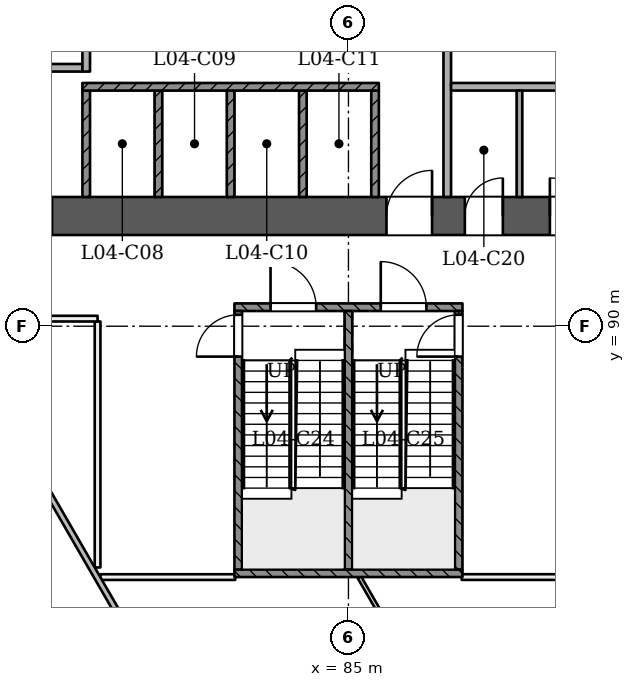
"""IFC4 building model, lengths in metres.
Left out: names, types, materials, properties, quantities, classifications, styles, units other than length and angle.
Written with IfcOpenShell. Run it as: python <this file> out.ifc"""

import sys

from ifc_helpers import new_model, si_unit, direction, frame, frame_2d, origin, place, context, subcontext, project, spatial, rectangle, extrude, element, fill, save


model = new_model("IFC4")
c1 = context("Model", 3, precision=1e-05, world=origin(), true_north=direction((0.0, 1.0)))
c2 = subcontext(c1, "Body", "Model", "MODEL_VIEW")
j1 = project(units=[si_unit("LENGTHUNIT", "METRE"), si_unit("PLANEANGLEUNIT", "RADIAN")], contexts=[c1])
p1 = place(None, origin())
s1 = spatial("IfcSite", under=j1, at=p1, CompositionType="ELEMENT")
p2 = place(p1, origin())
s2 = spatial("IfcBuilding", under=s1, at=p2, CompositionType="ELEMENT")
p3 = place(p2, frame((0.0, 0.0, 22.5)))
s3 = spatial("IfcBuildingStorey", under=s2, at=p3, CompositionType="ELEMENT", Elevation=22.5)
p4 = place(p3, frame((72.5, 92.9, 0.0), z_axis=(0.0, 0.0, 1.0), x_axis=(1.0, 0.0, 0.0)))
e1 = element("IfcWall", 1, at=p4, inside=s3, PredefinedType="SHEAR", context=c2, shape_type="SweptSolid", body=[
    extrude(rectangle(XDim=25.5, YDim=1.0, at=frame_2d((12.75, 0.0))), origin(), (0.0, 0.0, 1.0), 4.5),
])
p5 = place(p4, frame((1.3, 0.0, 0.0)))
e2 = element("IfcOpeningElement", 2, at=p5, cuts=e1, PredefinedType="OPENING", context=c2, shape_type="SweptSolid", body=[
    extrude(rectangle(XDim=1.2, YDim=2.1, at=frame_2d((0.6, 1.05))), frame((0.0, 0.51, 0.0), z_axis=(0.0, -1.0, 0.0), x_axis=(1.0, 0.0, 0.0)), (0.0, 0.0, 1.0), 1.021),
])
p6 = place(p4, frame((3.5, 0.0, 0.0)))
e3 = element("IfcOpeningElement", 3, at=p6, cuts=e1, PredefinedType="OPENING", context=c2, shape_type="SweptSolid", body=[
    extrude(rectangle(XDim=1.2, YDim=2.1, at=frame_2d((0.6, 1.05))), frame((0.0, 0.51, 0.0), z_axis=(0.0, -1.0, 0.0), x_axis=(1.0, 0.0, 0.0)), (0.0, 0.0, 1.0), 1.021),
])
p7 = place(p4, frame((13.5, 0.0, 0.0)))
e4 = element("IfcOpeningElement", 4, at=p7, cuts=e1, PredefinedType="OPENING", context=c2, shape_type="SweptSolid", body=[
    extrude(rectangle(XDim=1.2, YDim=2.1, at=frame_2d((0.6, 1.05))), frame((0.0, 0.51, 0.0), z_axis=(0.0, -1.0, 0.0), x_axis=(1.0, 0.0, 0.0)), (0.0, 0.0, 1.0), 1.021),
])
p8 = place(p4, frame((15.562, 0.0, 0.0)))
e5 = element("IfcOpeningElement", 5, at=p8, cuts=e1, PredefinedType="OPENING", context=c2, shape_type="SweptSolid", body=[
    extrude(rectangle(XDim=1.0, YDim=2.1, at=frame_2d((0.5, 1.05))), frame((0.0, 0.51, 0.0), z_axis=(0.0, -1.0, 0.0), x_axis=(1.0, 0.0, 0.0)), (0.0, 0.0, 1.0), 1.021),
])
p9 = place(p4, frame((17.8, 0.0, 0.0)))
e6 = element("IfcOpeningElement", 6, at=p9, cuts=e1, PredefinedType="OPENING", context=c2, shape_type="SweptSolid", body=[
    extrude(rectangle(XDim=1.0, YDim=2.1, at=frame_2d((0.5, 1.05))), frame((0.0, 0.51, 0.0), z_axis=(0.0, -1.0, 0.0), x_axis=(1.0, 0.0, 0.0)), (0.0, 0.0, 1.0), 1.021),
])
p10 = place(p4, frame((20.35, 0.0, 0.0)))
e7 = element("IfcOpeningElement", 7, at=p10, cuts=e1, PredefinedType="OPENING", context=c2, shape_type="SweptSolid", body=[
    extrude(rectangle(XDim=1.0, YDim=2.1, at=frame_2d((0.5, 1.05))), frame((0.0, 0.51, 0.0), z_axis=(0.0, -1.0, 0.0), x_axis=(1.0, 0.0, 0.0)), (0.0, 0.0, 1.0), 1.021),
])
p11 = place(p4, frame((22.837, 0.0, 0.0)))
e8 = element("IfcOpeningElement", 8, at=p11, cuts=e1, PredefinedType="OPENING", context=c2, shape_type="SweptSolid", body=[
    extrude(rectangle(XDim=1.0, YDim=2.1, at=frame_2d((0.5, 1.05))), frame((0.0, 0.51, 0.0), z_axis=(0.0, -1.0, 0.0), x_axis=(1.0, 0.0, 0.0)), (0.0, 0.0, 1.0), 1.021),
])
p12 = place(p3, frame((61.093, 96.062, 0.0), z_axis=(0.0, 0.0, 1.0), x_axis=(0.5000018851, -0.866024315419, 0.0)))
e9 = element("IfcWall", 9, at=p12, inside=s3, PredefinedType="PARTITIONING", context=c2, shape_type="SweptSolid", body=[
    extrude(rectangle(XDim=45.0, YDim=0.15, at=frame_2d((22.5, 0.0))), origin(), (0.0, 0.0, 1.0), 3.6),
])
p13 = place(p12, frame((6.15, 0.0, 0.0)))
e10 = element("IfcOpeningElement", 10, at=p13, cuts=e9, PredefinedType="OPENING", context=c2, shape_type="SweptSolid", body=[
    extrude(rectangle(XDim=1.2, YDim=2.1, at=frame_2d((0.6, 1.05))), frame((0.0, 0.085, 0.0), z_axis=(0.0, -1.0, 0.0), x_axis=(1.0, 0.0, 0.0)), (0.0, 0.0, 1.0), 0.171),
])
p14 = place(p12, frame((16.3, 0.0, 0.0)))
e11 = element("IfcOpeningElement", 11, at=p14, cuts=e9, PredefinedType="OPENING", context=c2, shape_type="SweptSolid", body=[
    extrude(rectangle(XDim=1.2, YDim=2.1, at=frame_2d((0.6, 1.05))), frame((0.0, 0.085, 0.0), z_axis=(0.0, -1.0, 0.0), x_axis=(1.0, 0.0, 0.0)), (0.0, 0.0, 1.0), 0.171),
])
p15 = place(p12, frame((24.25, 0.0, 0.0)))
e12 = element("IfcOpeningElement", 12, at=p15, cuts=e9, PredefinedType="OPENING", context=c2, shape_type="SweptSolid", body=[
    extrude(rectangle(XDim=1.0, YDim=2.1, at=frame_2d((0.5, 1.05))), frame((0.0, 0.085, 0.0), z_axis=(0.0, -1.0, 0.0), x_axis=(1.0, 0.0, 0.0)), (0.0, 0.0, 1.0), 0.171),
])
p16 = place(p12, frame((27.721, 0.0, 0.0)))
e13 = element("IfcOpeningElement", 13, at=p16, cuts=e9, PredefinedType="OPENING", context=c2, shape_type="SweptSolid", body=[
    extrude(rectangle(XDim=0.9, YDim=2.1, at=frame_2d((0.45, 1.05))), frame((0.0, 0.085, 0.0), z_axis=(0.0, -1.0, 0.0), x_axis=(1.0, 0.0, 0.0)), (0.0, 0.0, 1.0), 0.171),
])
p17 = place(p12, frame((29.971, 0.0, 0.0)))
e14 = element("IfcOpeningElement", 14, at=p17, cuts=e9, PredefinedType="OPENING", context=c2, shape_type="SweptSolid", body=[
    extrude(rectangle(XDim=0.9, YDim=2.1, at=frame_2d((0.45, 1.05))), frame((0.0, 0.085, 0.0), z_axis=(0.0, -1.0, 0.0), x_axis=(1.0, 0.0, 0.0)), (0.0, 0.0, 1.0), 0.171),
])
p18 = place(p12, frame((37.65, 0.0, 0.0)))
e15 = element("IfcOpeningElement", 15, at=p18, cuts=e9, PredefinedType="OPENING", context=c2, shape_type="SweptSolid", body=[
    extrude(rectangle(XDim=1.2, YDim=2.1, at=frame_2d((0.6, 1.05))), frame((0.0, 0.085, 0.0), z_axis=(0.0, -1.0, 0.0), x_axis=(1.0, 0.0, 0.0)), (0.0, 0.0, 1.0), 0.171),
])
p19 = place(p3, frame((86.407, 57.091, 0.0), z_axis=(0.0, 0.0, 1.0), x_axis=(0.49999953585, 0.866025671762, 0.0)))
e16 = element("IfcWall", 16, at=p19, inside=s3, PredefinedType="PARTITIONING", context=c2, shape_type="SweptSolid", body=[
    extrude(rectangle(XDim=45.0, YDim=0.15, at=frame_2d((22.5, 0.0))), origin(), (0.0, 0.0, 1.0), 3.6),
])
p20 = place(p19, frame((6.15, 0.0, 0.0)))
e17 = element("IfcOpeningElement", 17, at=p20, cuts=e16, PredefinedType="OPENING", context=c2, shape_type="SweptSolid", body=[
    extrude(rectangle(XDim=1.2, YDim=2.1, at=frame_2d((0.6, 1.05))), frame((0.0, 0.085, 0.0), z_axis=(0.0, -1.0, 0.0), x_axis=(1.0, 0.0, 0.0)), (0.0, 0.0, 1.0), 0.171),
])
p21 = place(p19, frame((16.3, 0.0, 0.0)))
e18 = element("IfcOpeningElement", 18, at=p21, cuts=e16, PredefinedType="OPENING", context=c2, shape_type="SweptSolid", body=[
    extrude(rectangle(XDim=1.2, YDim=2.1, at=frame_2d((0.6, 1.05))), frame((0.0, 0.085, 0.0), z_axis=(0.0, -1.0, 0.0), x_axis=(1.0, 0.0, 0.0)), (0.0, 0.0, 1.0), 0.171),
])
p22 = place(p19, frame((24.25, 0.0, 0.0)))
e19 = element("IfcOpeningElement", 19, at=p22, cuts=e16, PredefinedType="OPENING", context=c2, shape_type="SweptSolid", body=[
    extrude(rectangle(XDim=1.0, YDim=2.1, at=frame_2d((0.5, 1.05))), frame((0.0, 0.085, 0.0), z_axis=(0.0, -1.0, 0.0), x_axis=(1.0, 0.0, 0.0)), (0.0, 0.0, 1.0), 0.171),
])
p23 = place(p19, frame((30.9, 0.0, 0.0)))
e20 = element("IfcOpeningElement", 20, at=p23, cuts=e16, PredefinedType="OPENING", context=c2, shape_type="SweptSolid", body=[
    extrude(rectangle(XDim=1.2, YDim=2.1, at=frame_2d((0.6, 1.05))), frame((0.0, 0.085, 0.0), z_axis=(0.0, -1.0, 0.0), x_axis=(1.0, 0.0, 0.0)), (0.0, 0.0, 1.0), 0.171),
])
p24 = place(p19, frame((36.761, 0.0, 0.0)))
e21 = element("IfcOpeningElement", 21, at=p24, cuts=e16, PredefinedType="OPENING", context=c2, shape_type="SweptSolid", body=[
    extrude(rectangle(XDim=1.0, YDim=2.1, at=frame_2d((0.5, 1.05))), frame((0.0, 0.085, 0.0), z_axis=(0.0, -1.0, 0.0), x_axis=(1.0, 0.0, 0.0)), (0.0, 0.0, 1.0), 0.171),
])
p25 = place(p19, frame((39.011, 0.0, 0.0)))
e22 = element("IfcOpeningElement", 22, at=p25, cuts=e16, PredefinedType="OPENING", context=c2, shape_type="SweptSolid", body=[
    extrude(rectangle(XDim=1.0, YDim=2.1, at=frame_2d((0.5, 1.05))), frame((0.0, 0.085, 0.0), z_axis=(0.0, -1.0, 0.0), x_axis=(1.0, 0.0, 0.0)), (0.0, 0.0, 1.0), 0.171),
])
p26 = place(p19, frame((42.25, 0.0, 0.0)))
e23 = element("IfcOpeningElement", 23, at=p26, cuts=e16, PredefinedType="OPENING", context=c2, shape_type="SweptSolid", body=[
    extrude(rectangle(XDim=1.0, YDim=2.1, at=frame_2d((0.5, 1.05))), frame((0.0, 0.085, 0.0), z_axis=(0.0, -1.0, 0.0), x_axis=(1.0, 0.0, 0.0)), (0.0, 0.0, 1.0), 0.171),
])
p27 = place(p3, frame((87.98, 83.4, 0.0), z_axis=(0.0, 0.0, 1.0), x_axis=(0.99999999763, -6.8851556e-05, 0.0)))
e24 = element("IfcWall", 24, at=p27, inside=s3, PredefinedType="PARTITIONING", context=c2, shape_type="SweptSolid", body=[
    extrude(rectangle(XDim=3.546, YDim=0.15, at=frame_2d((1.773, 0.0))), origin(), (0.0, 0.0, 1.0), 4.0),
])
p28 = place(p3, frame((102.75, 90.199, 0.0), z_axis=(0.0, 0.0, 1.0), x_axis=(-0.500001686779, -0.86602442992, 0.0)))
e25 = element("IfcWall", 25, at=p28, inside=s3, PredefinedType="PARTITIONING", context=c2, shape_type="SweptSolid", body=[
    extrude(rectangle(XDim=35.37, YDim=0.15, at=frame_2d((17.685, 0.0))), origin(), (0.0, 0.0, 1.0), 4.0),
])
p29 = place(p28, frame((10.315, 0.0, 0.0)))
e26 = element("IfcOpeningElement", 26, at=p29, cuts=e25, PredefinedType="OPENING", context=c2, shape_type="SweptSolid", body=[
    extrude(rectangle(XDim=1.0, YDim=2.1, at=frame_2d((0.5, 1.05))), frame((0.0, 0.085, 0.0), z_axis=(0.0, -1.0, 0.0), x_axis=(1.0, 0.0, 0.0)), (0.0, 0.0, 1.0), 0.171),
])
p30 = place(p28, frame((21.571, 0.0, 0.0)))
e27 = element("IfcOpeningElement", 27, at=p30, cuts=e25, PredefinedType="OPENING", context=c2, shape_type="SweptSolid", body=[
    extrude(rectangle(XDim=1.0, YDim=2.1, at=frame_2d((0.5, 1.05))), frame((0.0, 0.085, 0.0), z_axis=(0.0, -1.0, 0.0), x_axis=(1.0, 0.0, 0.0)), (0.0, 0.0, 1.0), 0.171),
])
p31 = place(p28, frame((28.397, 0.0, 0.0)))
e28 = element("IfcOpeningElement", 28, at=p31, cuts=e25, PredefinedType="OPENING", context=c2, shape_type="SweptSolid", body=[
    extrude(rectangle(XDim=1.0, YDim=2.1, at=frame_2d((0.5, 1.05))), frame((0.0, 0.085, 0.0), z_axis=(0.0, -1.0, 0.0), x_axis=(1.0, 0.0, 0.0)), (0.0, 0.0, 1.0), 0.171),
])
p32 = place(p3, frame((78.399, 90.124, 0.0), z_axis=(0.0, 0.0, 1.0), x_axis=(0.0, -1.0, 0.0)))
e29 = element("IfcWall", 29, at=p32, inside=s3, PredefinedType="PARTITIONING", context=c2, shape_type="SweptSolid", body=[
    extrude(rectangle(XDim=6.471, YDim=0.15, at=frame_2d((3.236, 0.0))), origin(), (0.0, 0.0, 1.0), 4.0),
])
p33 = place(p3, frame((78.474, 83.399, 0.0), z_axis=(0.0, 0.0, 1.0), x_axis=(1.0, 0.0, 0.0)))
e30 = element("IfcWall", 30, at=p33, inside=s3, PredefinedType="PARTITIONING", context=c2, shape_type="SweptSolid", body=[
    extrude(rectangle(XDim=3.546, YDim=0.15, at=frame_2d((1.773, 0.0))), origin(), (0.0, 0.0, 1.0), 4.0),
])
p34 = place(p3, frame((85.0, 59.456, 0.0), z_axis=(0.0, 0.0, 1.0), x_axis=(-0.5000008632, 0.866024905415, 0.0)))
e31 = element("IfcWall", 31, at=p34, inside=s3, PredefinedType="PARTITIONING", context=c2, shape_type="SweptSolid", body=[
    extrude(rectangle(XDim=35.5, YDim=0.15, at=frame_2d((17.75, 0.0))), origin(), (0.0, 0.0, 1.0), 4.0),
])
p35 = place(p34, frame((17.25, 0.0, 0.0)))
e32 = element("IfcOpeningElement", 32, at=p35, cuts=e31, PredefinedType="OPENING", context=c2, shape_type="SweptSolid", body=[
    extrude(rectangle(XDim=1.0, YDim=2.1, at=frame_2d((0.5, 1.05))), frame((0.0, 0.085, 0.0), z_axis=(0.0, -1.0, 0.0), x_axis=(1.0, 0.0, 0.0)), (0.0, 0.0, 1.0), 0.171),
])
p36 = place(p3, frame((67.38, 90.199, 0.0), z_axis=(0.0, 0.0, 1.0), x_axis=(1.0, 0.0, 0.0)))
e33 = element("IfcWall", 33, at=p36, inside=s3, PredefinedType="PARTITIONING", context=c2, shape_type="SweptSolid", body=[
    extrude(rectangle(XDim=11.019, YDim=0.15, at=frame_2d((5.509, 0.0))), origin(), (0.0, 0.0, 1.0), 4.0),
])
p37 = place(p3, frame((85.284, 83.4, 0.0), z_axis=(0.0, 0.0, 1.0), x_axis=(0.500002148711, -0.866024163222, 0.0)))
e34 = element("IfcWall", 34, at=p37, inside=s3, PredefinedType="PARTITIONING", context=c2, shape_type="SweptSolid", body=[
    extrude(rectangle(XDim=13.424, YDim=0.1, at=frame_2d((6.712, 0.0))), origin(), (0.0, 0.0, 1.0), 4.0),
])
p38 = place(p3, frame((74.523, 90.086, 0.0), z_axis=(0.0, 0.0, 1.0), x_axis=(0.49999737825, -0.866026917447, 0.0)))
e35 = element("IfcWall", 35, at=p38, inside=s3, PredefinedType="PARTITIONING", context=c2, shape_type="SweptSolid", body=[
    extrude(rectangle(XDim=28.032, YDim=0.15, at=frame_2d((14.016, 0.0))), origin(), (0.0, 0.0, 1.0), 4.0),
])
p39 = place(p3, frame((86.737, 62.689, 0.0), z_axis=(0.0, 0.0, 1.0), x_axis=(-0.500007698748, 0.866020958865, 0.0)))
e36 = element("IfcWall", 36, at=p39, inside=s3, PredefinedType="PARTITIONING", context=c2, shape_type="SweptSolid", body=[
    extrude(rectangle(XDim=31.636, YDim=0.15, at=frame_2d((15.818, 0.0))), origin(), (0.0, 0.0, 1.0), 4.0),
])
for number, where, z_axis, x_axis in (
    (37, (78.1, 93.4, 0.0), (0.0, 0.0, 1.0), (0.0, 1.0, 0.0)),
    (38, (80.0, 93.4, 0.0), (0.0, 0.0, 1.0), (0.0, 1.0, 0.0)),
    (39, (81.9, 93.4, 0.0), (0.0, 0.0, 1.0), (0.0, 1.0, 0.0)),
    (40, (83.8, 93.4, 0.0), (0.0, 0.0, 1.0), (0.0, 1.0, 0.0)),
    (41, (85.7, 93.4, 0.0), (0.0, 0.0, 1.0), (0.0, 1.0, 0.0)),
):
    element("IfcWall", number, at=place(p3, frame(where, z_axis=z_axis, x_axis=x_axis)), inside=s3, PredefinedType="SOLIDWALL", context=c2, shape_type="SweptSolid", body=[
        extrude(rectangle(XDim=2.8, YDim=0.2, at=frame_2d((1.4, 0.0))), origin(), (0.0, 0.0, 1.0), 4.0),
    ])
p40 = place(p3, frame((87.6, 93.4, 0.0), z_axis=(0.0, 0.0, 1.0), x_axis=(0.0, 1.0, 0.0)))
e42 = element("IfcWall", 42, at=p40, inside=s3, PredefinedType="PARTITIONING", context=c2, shape_type="SweptSolid", body=[
    extrude(rectangle(XDim=7.0, YDim=0.2, at=frame_2d((3.5, 0.0))), origin(), (0.0, 0.0, 1.0), 4.0),
])
p41 = place(p40, frame((4.45, 0.0, 0.0)))
e43 = element("IfcOpeningElement", 43, at=p41, cuts=e42, PredefinedType="OPENING", context=c2, shape_type="SweptSolid", body=[
    extrude(rectangle(XDim=1.1, YDim=2.1, at=frame_2d((0.55, 1.05))), frame((0.0, 0.11, 0.0), z_axis=(0.0, -1.0, 0.0), x_axis=(1.0, 0.0, 0.0)), (0.0, 0.0, 1.0), 0.221),
])
p42 = place(p3, frame((89.5, 93.4, 0.0), z_axis=(0.0, 0.0, 1.0), x_axis=(0.0, 1.0, 0.0)))
e44 = element("IfcWall", 44, at=p42, inside=s3, PredefinedType="PARTITIONING", context=c2, shape_type="SweptSolid", body=[
    extrude(rectangle(XDim=2.8, YDim=0.15, at=frame_2d((1.4, 0.0))), origin(), (0.0, 0.0, 1.0), 4.0),
])
p43 = place(p3, frame((78.0, 96.3, 0.0), z_axis=(0.0, 0.0, 1.0), x_axis=(1.0, 0.0, 0.0)))
e45 = element("IfcWall", 45, at=p43, inside=s3, PredefinedType="SOLIDWALL", context=c2, shape_type="SweptSolid", body=[
    extrude(rectangle(XDim=7.8, YDim=0.2, at=frame_2d((3.9, 0.0))), origin(), (0.0, 0.0, 1.0), 4.0),
])
p44 = place(p3, frame((87.7, 96.3, 0.0), z_axis=(0.0, 0.0, 1.0), x_axis=(1.0, 0.0, 0.0)))
e46 = element("IfcWall", 46, at=p44, inside=s3, PredefinedType="PARTITIONING", context=c2, shape_type="SweptSolid", body=[
    extrude(rectangle(XDim=3.6, YDim=0.2, at=frame_2d((1.8, 0.0))), origin(), (0.0, 0.0, 1.0), 4.0),
])
p45 = place(p3, frame((76.1, 96.8, 0.0), z_axis=(0.0, 0.0, 1.0), x_axis=(1.0, 0.0, 0.0)))
e47 = element("IfcWall", 47, at=p45, inside=s3, PredefinedType="PARTITIONING", context=c2, shape_type="SweptSolid", body=[
    extrude(rectangle(XDim=1.9, YDim=0.2, at=frame_2d((0.95, 0.0))), origin(), (0.0, 0.0, 1.0), 4.0),
])
p46 = place(p3, frame((78.1, 96.7, 0.0), z_axis=(0.0, 0.0, 1.0), x_axis=(0.0, 1.0, 0.0)))
e48 = element("IfcWall", 48, at=p46, inside=s3, PredefinedType="PARTITIONING", context=c2, shape_type="SweptSolid", body=[
    extrude(rectangle(XDim=3.7, YDim=0.2, at=frame_2d((1.85, 0.0))), origin(), (0.0, 0.0, 1.0), 4.0),
])
p47 = place(p46, frame((1.95, 0.0, 0.0)))
e49 = element("IfcOpeningElement", 49, at=p47, cuts=e48, PredefinedType="OPENING", context=c2, shape_type="SweptSolid", body=[
    extrude(rectangle(XDim=1.1, YDim=2.1, at=frame_2d((0.55, 1.05))), frame((0.0, 0.11, 0.0), z_axis=(0.0, -1.0, 0.0), x_axis=(1.0, 0.0, 0.0)), (0.0, 0.0, 1.0), 0.221),
])
p48 = place(p3, frame((82.0, 90.5, 0.0), z_axis=(0.0, 0.0, 1.0), x_axis=(1.0, 0.0, 0.0)))
e50 = element("IfcWall", 50, at=p48, inside=s3, PredefinedType="SOLIDWALL", context=c2, shape_type="SweptSolid", body=[
    extrude(rectangle(XDim=6.0, YDim=0.2, at=frame_2d((3.0, 0.0))), origin(), (0.0, 0.0, 1.0), 4.0),
])
p49 = place(p48, frame((0.95, 0.0, 0.0)))
e51 = element("IfcOpeningElement", 51, at=p49, cuts=e50, PredefinedType="OPENING", context=c2, shape_type="SweptSolid", body=[
    extrude(rectangle(XDim=1.2, YDim=2.1, at=frame_2d((0.6, 1.05))), frame((0.0, 0.11, 0.0), z_axis=(0.0, -1.0, 0.0), x_axis=(1.0, 0.0, 0.0)), (0.0, 0.0, 1.0), 0.221),
])
p50 = place(p48, frame((3.85, 0.0, 0.0)))
e52 = element("IfcOpeningElement", 52, at=p50, cuts=e50, PredefinedType="OPENING", context=c2, shape_type="SweptSolid", body=[
    extrude(rectangle(XDim=1.2, YDim=2.1, at=frame_2d((0.6, 1.05))), frame((0.0, 0.11, 0.0), z_axis=(0.0, -1.0, 0.0), x_axis=(1.0, 0.0, 0.0)), (0.0, 0.0, 1.0), 0.221),
])
p51 = place(p3, frame((82.0, 83.5, 0.0), z_axis=(0.0, 0.0, 1.0), x_axis=(1.0, 0.0, 0.0)))
e53 = element("IfcWall", 53, at=p51, inside=s3, PredefinedType="SOLIDWALL", context=c2, shape_type="SweptSolid", body=[
    extrude(rectangle(XDim=6.0, YDim=0.2, at=frame_2d((3.0, 0.0))), origin(), (0.0, 0.0, 1.0), 4.0),
])
p52 = place(p3, frame((82.1, 83.6, 0.0), z_axis=(0.0, 0.0, 1.0), x_axis=(0.0, 1.0, 0.0)))
e54 = element("IfcWall", 54, at=p52, inside=s3, PredefinedType="SOLIDWALL", context=c2, shape_type="SweptSolid", body=[
    extrude(rectangle(XDim=6.8, YDim=0.2, at=frame_2d((3.4, 0.0))), origin(), (0.0, 0.0, 1.0), 4.0),
])
p53 = place(p52, frame((5.6, 0.0, 0.0)))
e55 = element("IfcOpeningElement", 55, at=p53, cuts=e54, PredefinedType="OPENING", context=c2, shape_type="SweptSolid", body=[
    extrude(rectangle(XDim=1.1, YDim=2.1, at=frame_2d((0.55, 1.05))), frame((0.0, 0.11, 0.0), z_axis=(0.0, -1.0, 0.0), x_axis=(1.0, 0.0, 0.0)), (0.0, 0.0, 1.0), 0.221),
])
p54 = place(p3, frame((87.9, 83.6, 0.0), z_axis=(0.0, 0.0, 1.0), x_axis=(0.0, 1.0, 0.0)))
e56 = element("IfcWall", 56, at=p54, inside=s3, PredefinedType="SOLIDWALL", context=c2, shape_type="SweptSolid", body=[
    extrude(rectangle(XDim=6.8, YDim=0.2, at=frame_2d((3.4, 0.0))), origin(), (0.0, 0.0, 1.0), 4.0),
])
p55 = place(p54, frame((5.6, 0.0, 0.0)))
e57 = element("IfcOpeningElement", 57, at=p55, cuts=e56, PredefinedType="OPENING", context=c2, shape_type="SweptSolid", body=[
    extrude(rectangle(XDim=1.1, YDim=2.1, at=frame_2d((0.55, 1.05))), frame((0.0, 0.11, 0.0), z_axis=(0.0, -1.0, 0.0), x_axis=(1.0, 0.0, 0.0)), (0.0, 0.0, 1.0), 0.221),
])
p56 = place(p3, frame((85.0, 83.6, 0.0), z_axis=(0.0, 0.0, 1.0), x_axis=(0.0, 1.0, 0.0)))
e58 = element("IfcWall", 58, at=p56, inside=s3, PredefinedType="SOLIDWALL", context=c2, shape_type="SweptSolid", body=[
    extrude(rectangle(XDim=6.8, YDim=0.2, at=frame_2d((3.4, 0.0))), origin(), (0.0, 0.0, 1.0), 4.0),
])
p57 = place(p6, origin())
e59 = element("IfcDoor", 59, at=p57, inside=s3, OperationType="SINGLE_SWING_LEFT", PredefinedType="NOTDEFINED", context=c2, shape_type="SweptSolid", body=[
    extrude(rectangle(XDim=1.2, YDim=2.1, at=frame_2d((0.6, 1.05))), frame((0.0, 0.025, 0.0), z_axis=(0.0, -1.0, 0.0), x_axis=(1.0, 0.0, 0.0)), (0.0, 0.0, 1.0), 0.05),
])
fill(e3, e59)
p58 = place(p7, origin())
e60 = element("IfcDoor", 60, at=p58, inside=s3, OperationType="SINGLE_SWING_RIGHT", PredefinedType="NOTDEFINED", context=c2, shape_type="SweptSolid", body=[
    extrude(rectangle(XDim=1.2, YDim=2.1, at=frame_2d((0.6, 1.05))), frame((0.0, 0.025, 0.0), z_axis=(0.0, -1.0, 0.0), x_axis=(1.0, 0.0, 0.0)), (0.0, 0.0, 1.0), 0.05),
])
fill(e4, e60)
p59 = place(p8, origin())
e61 = element("IfcDoor", 61, at=p59, inside=s3, OperationType="SINGLE_SWING_RIGHT", PredefinedType="NOTDEFINED", context=c2, shape_type="SweptSolid", body=[
    extrude(rectangle(XDim=1.0, YDim=2.1, at=frame_2d((0.5, 1.05))), frame((0.0, 0.025, 0.0), z_axis=(0.0, -1.0, 0.0), x_axis=(1.0, 0.0, 0.0)), (0.0, 0.0, 1.0), 0.05),
])
fill(e5, e61)
p60 = place(p9, origin())
e62 = element("IfcDoor", 62, at=p60, inside=s3, OperationType="SINGLE_SWING_LEFT", PredefinedType="NOTDEFINED", context=c2, shape_type="SweptSolid", body=[
    extrude(rectangle(XDim=1.0, YDim=2.1, at=frame_2d((0.5, 1.05))), frame((0.0, 0.025, 0.0), z_axis=(0.0, -1.0, 0.0), x_axis=(1.0, 0.0, 0.0)), (0.0, 0.0, 1.0), 0.05),
])
fill(e6, e62)
p61 = place(p49, origin())
e63 = element("IfcDoor", 63, at=p61, inside=s3, OperationType="SINGLE_SWING_LEFT", PredefinedType="NOTDEFINED", context=c2, shape_type="SweptSolid", body=[
    extrude(rectangle(XDim=1.2, YDim=2.1, at=frame_2d((0.6, 1.05))), frame((0.0, 0.025, 0.0), z_axis=(0.0, -1.0, 0.0), x_axis=(1.0, 0.0, 0.0)), (0.0, 0.0, 1.0), 0.05),
])
fill(e51, e63)
p62 = place(p53, origin())
e64 = element("IfcDoor", 64, at=p62, inside=s3, OperationType="SINGLE_SWING_LEFT", PredefinedType="NOTDEFINED", context=c2, shape_type="SweptSolid", body=[
    extrude(rectangle(XDim=1.1, YDim=2.1, at=frame_2d((0.55, 1.05))), frame((0.0, 0.025, 0.0), z_axis=(0.0, -1.0, 0.0), x_axis=(1.0, 0.0, 0.0)), (0.0, 0.0, 1.0), 0.05),
])
fill(e55, e64)
p63 = place(p50, origin())
e65 = element("IfcDoor", 65, at=p63, inside=s3, OperationType="SINGLE_SWING_LEFT", PredefinedType="NOTDEFINED", context=c2, shape_type="SweptSolid", body=[
    extrude(rectangle(XDim=1.2, YDim=2.1, at=frame_2d((0.6, 1.05))), frame((0.0, 0.025, 0.0), z_axis=(0.0, -1.0, 0.0), x_axis=(1.0, 0.0, 0.0)), (0.0, 0.0, 1.0), 0.05),
])
fill(e52, e65)
p64 = place(p55, frame((1.1, 0.0, 0.0), z_axis=(0.0, 0.0, 1.0), x_axis=(-1.0, 0.0, 0.0)))
e66 = element("IfcDoor", 66, at=p64, inside=s3, OperationType="SINGLE_SWING_LEFT", PredefinedType="NOTDEFINED", context=c2, shape_type="SweptSolid", body=[
    extrude(rectangle(XDim=1.1, YDim=2.1, at=frame_2d((0.55, 1.05))), frame((0.0, 0.025, 0.0), z_axis=(0.0, -1.0, 0.0), x_axis=(1.0, 0.0, 0.0)), (0.0, 0.0, 1.0), 0.05),
])
fill(e57, e66)
save(model, sys.argv[1])
